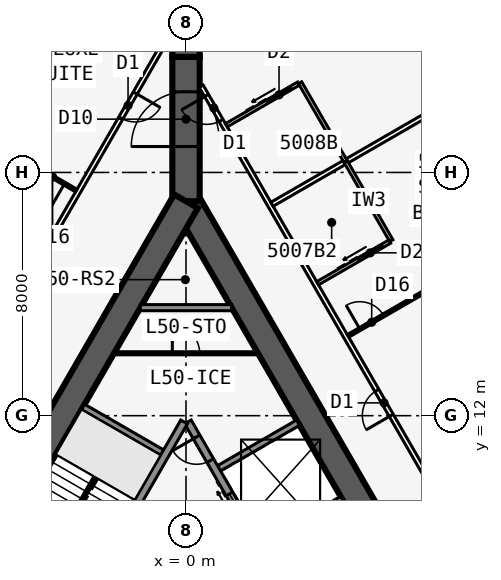
"""IFC4 building model, lengths in metres.
Left out: names, types, materials, properties, quantities, classifications, styles, units other than length and angle.
Written with IfcOpenShell. Run it as: python <this file> out.ifc"""

import sys

from ifc_helpers import new_model, si_unit, direction, frame, frame_2d, origin, place, context, subcontext, project, spatial, rectangle, extrude, element, fill, save


model = new_model("IFC4")
c1 = context("Model", 3, precision=1e-05, world=origin(), true_north=direction((0.0, 1.0)))
c2 = subcontext(c1, "Body", "Model", "MODEL_VIEW")
j1 = project(units=[si_unit("LENGTHUNIT", "METRE"), si_unit("PLANEANGLEUNIT", "RADIAN")], contexts=[c1])
p1 = place(None, origin())
s1 = spatial("IfcSite", under=j1, at=p1, CompositionType="ELEMENT")
p2 = place(p1, origin())
s2 = spatial("IfcBuilding", under=s1, at=p2, CompositionType="ELEMENT")
p3 = place(p2, frame((0.0, 0.0, 186.1)))
s3 = spatial("IfcBuildingStorey", under=s2, at=p3, CompositionType="ELEMENT", Elevation=186.1)
p4 = place(p3, frame((16.5, -9.526, 0.0), z_axis=(0.0, 0.0, 1.0), x_axis=(-0.499999749417, 0.866025548458, 0.0)))
e1 = element("IfcWall", 1, at=p4, inside=s3, PredefinedType="SHEAR", context=c2, shape_type="SweptSolid", body=[
    extrude(rectangle(XDim=33.0, YDim=0.9, at=frame_2d((16.5, 0.0))), origin(), (0.0, 0.0, 1.0), 3.4),
])
p5 = place(p4, frame((14.15, 0.0, 0.0)))
e2 = element("IfcOpeningElement", 2, at=p5, cuts=e1, PredefinedType="OPENING", context=c2, shape_type="SweptSolid", body=[
    extrude(rectangle(XDim=1.8, YDim=2.13, at=frame_2d((0.9, 1.065))), frame((0.0, 0.46, 0.0), z_axis=(0.0, -1.0, 0.0), x_axis=(1.0, 0.0, 0.0)), (0.0, 0.0, 1.0), 0.92),
])
p6 = place(p4, frame((12.6, 0.0, 0.0)))
e3 = element("IfcOpeningElement", 3, at=p6, cuts=e1, PredefinedType="OPENING", context=c2, shape_type="SweptSolid", body=[
    extrude(rectangle(XDim=1.0, YDim=2.13, at=frame_2d((0.5, 1.065))), frame((0.0, 0.46, 0.0), z_axis=(0.0, -1.0, 0.0), x_axis=(1.0, 0.0, 0.0)), (0.0, 0.0, 1.0), 0.92),
])
p7 = place(p3, frame((5.379, 2.586, 0.0), z_axis=(0.0, 0.0, 1.0), x_axis=(-0.500001375892, 0.866024609411, 0.0)))
e4 = element("IfcWall", 4, at=p7, inside=s3, PredefinedType="SOLIDWALL", context=c2, shape_type="SweptSolid", body=[
    extrude(rectangle(XDim=10.633, YDim=0.25, at=frame_2d((5.316, 0.0))), origin(), (0.0, 0.0, 1.0), 3.15),
])
p8 = place(p7, frame((9.164, 0.0, 0.0)))
e5 = element("IfcOpeningElement", 5, at=p8, cuts=e4, PredefinedType="OPENING", context=c2, shape_type="SweptSolid", body=[
    extrude(rectangle(XDim=0.9, YDim=2.13, at=frame_2d((0.45, 1.065))), frame((0.0, 0.135, 0.0), z_axis=(0.0, -1.0, 0.0), x_axis=(1.0, 0.0, 0.0)), (0.0, 0.0, 1.0), 0.27),
])
p9 = place(p7, frame((1.0, 0.0, 0.0)))
e6 = element("IfcOpeningElement", 6, at=p9, cuts=e4, PredefinedType="OPENING", context=c2, shape_type="SweptSolid", body=[
    extrude(rectangle(XDim=1.1, YDim=2.13, at=frame_2d((0.55, 1.065))), frame((0.0, 0.135, 0.0), z_axis=(0.0, -1.0, 0.0), x_axis=(1.0, 0.0, 0.0)), (0.0, 0.0, 1.0), 0.27),
])
p10 = place(p7, frame((3.9, 0.0, 0.0)))
e7 = element("IfcOpeningElement", 7, at=p10, cuts=e4, PredefinedType="OPENING", context=c2, shape_type="SweptSolid", body=[
    extrude(rectangle(XDim=1.1, YDim=2.13, at=frame_2d((0.55, 1.065))), frame((0.0, 0.135, 0.0), z_axis=(0.0, -1.0, 0.0), x_axis=(1.0, 0.0, 0.0)), (0.0, 0.0, 1.0), 0.27),
])
p11 = place(p7, frame((6.8, 0.0, 0.0)))
e8 = element("IfcOpeningElement", 8, at=p11, cuts=e4, PredefinedType="OPENING", context=c2, shape_type="SweptSolid", body=[
    extrude(rectangle(XDim=1.1, YDim=2.13, at=frame_2d((0.55, 1.065))), frame((0.0, 0.135, 0.0), z_axis=(0.0, -1.0, 0.0), x_axis=(1.0, 0.0, 0.0)), (0.0, 0.0, 1.0), 0.27),
])
for number, where, z_axis, x_axis in (
    (9, (2.429, 7.696, 0.0), (0.0, 0.0, 1.0), (0.866, 0.5, 0.0)),
    (10, (0.979, 10.207, 0.0), (0.0, 0.0, 1.0), (0.866, 0.5, 0.0)),
):
    element("IfcWall", number, at=place(p3, frame(where, z_axis=z_axis, x_axis=x_axis)), inside=s3, PredefinedType="SOLIDWALL", context=c2, shape_type="SweptSolid", body=[
        extrude(rectangle(XDim=3.125, YDim=0.2, at=frame_2d((1.562, 0.0))), origin(), (0.0, 0.0, 1.0), 3.15),
    ])
p12 = place(p3, frame((0.0, 19.052, 0.0), z_axis=(0.0, 0.0, 1.0), x_axis=(-0.499999749417, -0.866025548458, 0.0)))
e11 = element("IfcWall", 11, at=p12, inside=s3, PredefinedType="SHEAR", context=c2, shape_type="SweptSolid", body=[
    extrude(rectangle(XDim=33.0, YDim=0.9, at=frame_2d((16.5, 0.0))), origin(), (0.0, 0.0, 1.0), 3.4),
])
p13 = place(p12, frame((14.15, 0.0, 0.0)))
e12 = element("IfcOpeningElement", 12, at=p13, cuts=e11, PredefinedType="OPENING", context=c2, shape_type="SweptSolid", body=[
    extrude(rectangle(XDim=1.8, YDim=2.13, at=frame_2d((0.9, 1.065))), frame((0.0, 0.46, 0.0), z_axis=(0.0, -1.0, 0.0), x_axis=(1.0, 0.0, 0.0)), (0.0, 0.0, 1.0), 0.92),
])
p14 = place(p12, frame((12.6, 0.0, 0.0)))
e13 = element("IfcOpeningElement", 13, at=p14, cuts=e11, PredefinedType="OPENING", context=c2, shape_type="SweptSolid", body=[
    extrude(rectangle(XDim=1.0, YDim=2.13, at=frame_2d((0.5, 1.065))), frame((0.0, 0.46, 0.0), z_axis=(0.0, -1.0, 0.0), x_axis=(1.0, 0.0, 0.0)), (0.0, 0.0, 1.0), 0.92),
])
p15 = place(p3, frame((-0.062, 11.794, 0.0), z_axis=(0.0, 0.0, 1.0), x_axis=(-0.500006680225, -0.86602154692, 0.0)))
e14 = element("IfcWall", 14, at=p15, inside=s3, PredefinedType="SOLIDWALL", context=c2, shape_type="SweptSolid", body=[
    extrude(rectangle(XDim=7.733, YDim=0.25, at=frame_2d((3.866, 0.0))), origin(), (0.0, 0.0, 1.0), 3.15),
])
p16 = place(p3, frame((-0.679, 10.727, 0.0), z_axis=(0.0, 0.0, 1.0), x_axis=(-0.866022959057, 0.500004234368, 0.0)))
e15 = element("IfcWall", 15, at=p16, inside=s3, PredefinedType="SOLIDWALL", context=c2, shape_type="SweptSolid", body=[
    extrude(rectangle(XDim=3.125, YDim=0.2, at=frame_2d((1.562, 0.0))), origin(), (0.0, 0.0, 1.0), 3.15),
])
p17 = place(p3, frame((0.0, 19.052, 0.0), z_axis=(0.0, 0.0, 1.0), x_axis=(0.0, 1.0, 0.0)))
e16 = element("IfcWall", 16, at=p17, inside=s3, PredefinedType="SHEAR", context=c2, shape_type="SweptSolid", body=[
    extrude(rectangle(XDim=4.746, YDim=0.9, at=frame_2d((2.373, 0.0))), origin(), (0.0, 0.0, 1.0), 3.4),
])
p18 = place(p17, frame((1.8, 0.0, 0.0)))
e17 = element("IfcOpeningElement", 17, at=p18, cuts=e16, PredefinedType="OPENING", context=c2, shape_type="SweptSolid", body=[
    extrude(rectangle(XDim=1.8, YDim=2.13, at=frame_2d((0.9, 1.065))), frame((0.0, 0.46, 0.0), z_axis=(0.0, -1.0, 0.0), x_axis=(1.0, 0.0, 0.0)), (0.0, 0.0, 1.0), 0.92),
])
p19 = place(p3, frame((0.0, 23.799, 0.0), z_axis=(0.0, 0.0, 1.0), x_axis=(0.0, 1.0, 0.0)))
e18 = element("IfcWall", 18, at=p19, inside=s3, PredefinedType="SHEAR", context=c2, shape_type="SweptSolid", body=[
    extrude(rectangle(XDim=1.155, YDim=0.9, at=frame_2d((0.577, 0.0))), origin(), (0.0, 0.0, 1.0), 3.4),
])
p20 = place(p3, frame((9.471, 22.754, 0.0), z_axis=(0.0, 0.0, 1.0), x_axis=(-0.691719937936, 0.722165858693, 0.0)))
e19 = element("IfcWall", 19, at=p20, inside=s3, PredefinedType="STANDARD", context=c2, shape_type="SweptSolid", body=[
    extrude(rectangle(XDim=5.148, YDim=0.25, at=frame_2d((2.574, 0.0))), origin(), (0.0, 0.0, 1.0), 3.15),
])
p21 = place(p20, frame((0.774, 0.0, 0.45)))
e20 = element("IfcOpeningElement", 20, at=p21, cuts=e19, PredefinedType="OPENING", context=c2, shape_type="SweptSolid", body=[
    extrude(rectangle(XDim=3.6, YDim=2.4, at=frame_2d((1.8, 1.2))), frame((0.0, 0.135, 0.0), z_axis=(0.0, -1.0, 0.0), x_axis=(1.0, 0.0, 0.0)), (0.0, 0.0, 1.0), 0.27),
])
p22 = place(p3, frame((20.027, -10.985, 0.0), z_axis=(0.0, 0.0, 1.0), x_axis=(-0.500001677587, 0.866024435227, 0.0)))
e21 = element("IfcWall", 21, at=p22, inside=s3, PredefinedType="PARTITIONING", context=c2, shape_type="SweptSolid", body=[
    extrude(rectangle(XDim=39.054, YDim=0.15, at=frame_2d((19.527, 0.0))), origin(), (0.0, 0.0, 1.0), 3.15),
])
p23 = place(p22, frame((1.558, 0.0, 0.0)))
e22 = element("IfcOpeningElement", 22, at=p23, cuts=e21, PredefinedType="OPENING", context=c2, shape_type="SweptSolid", body=[
    extrude(rectangle(XDim=0.95, YDim=2.13, at=frame_2d((0.475, 1.065))), frame((0.0, 0.085, 0.0), z_axis=(0.0, -1.0, 0.0), x_axis=(1.0, 0.0, 0.0)), (0.0, 0.0, 1.0), 0.17),
])
p24 = place(p22, frame((12.752, 0.0, 0.0)))
e23 = element("IfcOpeningElement", 23, at=p24, cuts=e21, PredefinedType="OPENING", context=c2, shape_type="SweptSolid", body=[
    extrude(rectangle(XDim=0.95, YDim=2.13, at=frame_2d((0.475, 1.065))), frame((0.0, 0.085, 0.0), z_axis=(0.0, -1.0, 0.0), x_axis=(1.0, 0.0, 0.0)), (0.0, 0.0, 1.0), 0.17),
])
p25 = place(p22, frame((26.552, 0.0, 0.0)))
e24 = element("IfcOpeningElement", 24, at=p25, cuts=e21, PredefinedType="OPENING", context=c2, shape_type="SweptSolid", body=[
    extrude(rectangle(XDim=0.95, YDim=2.13, at=frame_2d((0.475, 1.065))), frame((0.0, 0.085, 0.0), z_axis=(0.0, -1.0, 0.0), x_axis=(1.0, 0.0, 0.0)), (0.0, 0.0, 1.0), 0.17),
])
p26 = place(p22, frame((37.752, 0.0, 0.0)))
e25 = element("IfcOpeningElement", 25, at=p26, cuts=e21, PredefinedType="OPENING", context=c2, shape_type="SweptSolid", body=[
    extrude(rectangle(XDim=0.95, YDim=2.13, at=frame_2d((0.475, 1.065))), frame((0.0, 0.085, 0.0), z_axis=(0.0, -1.0, 0.0), x_axis=(1.0, 0.0, 0.0)), (0.0, 0.0, 1.0), 0.17),
])
p27 = place(p3, frame((5.329, 14.623, 0.0), z_axis=(0.0, 0.0, 1.0), x_axis=(0.866011723728, 0.500023693804, 0.0)))
e26 = element("IfcWall", 26, at=p27, inside=s3, PredefinedType="PARTITIONING", context=c2, shape_type="SweptSolid", body=[
    extrude(rectangle(XDim=8.395, YDim=0.1, at=frame_2d((4.198, 0.0))), origin(), (0.0, 0.0, 1.0), 2.108),
])
p28 = place(p27, frame((0.45, 0.0, 0.0)))
e27 = element("IfcOpeningElement", 27, at=p28, cuts=e26, PredefinedType="OPENING", context=c2, shape_type="SweptSolid", body=[
    extrude(rectangle(XDim=0.9, YDim=2.032, at=frame_2d((0.45, 1.016))), frame((0.0, 0.06, 0.0), z_axis=(0.0, -1.0, 0.0), x_axis=(1.0, 0.0, 0.0)), (0.0, 0.0, 1.0), 0.12),
])
p29 = place(p3, frame((2.829, 18.954, 0.0), z_axis=(0.0, 0.0, 1.0), x_axis=(0.866015739374, 0.500016738876, 0.0)))
e28 = element("IfcWall", 28, at=p29, inside=s3, PredefinedType="PARTITIONING", context=c2, shape_type="SweptSolid", body=[
    extrude(rectangle(XDim=7.516, YDim=0.15, at=frame_2d((3.758, 0.0))), origin(), (0.0, 0.0, 1.0), 2.05),
])
p30 = place(p3, frame((6.753, 17.755, 0.0), z_axis=(0.0, 0.0, 1.0), x_axis=(-0.499990139034, 0.866031096941, 0.0)))
e29 = element("IfcWall", 29, at=p30, inside=s3, PredefinedType="PLUMBINGWALL", context=c2, shape_type="SweptSolid", body=[
    extrude(rectangle(XDim=3.0, YDim=0.12, at=frame_2d((1.5, 0.0))), origin(), (0.0, 0.0, 1.0), 3.15),
])
p31 = place(p3, frame((4.329, 16.355, 0.0), z_axis=(0.0, 0.0, 1.0), x_axis=(0.866035715982, 0.499982138324, 0.0)))
e30 = element("IfcWall", 30, at=p31, inside=s3, PredefinedType="PLUMBINGWALL", context=c2, shape_type="SweptSolid", body=[
    extrude(rectangle(XDim=2.74, YDim=0.12, at=frame_2d((1.37, 0.0))), origin(), (0.0, 0.0, 1.0), 3.15),
])
p32 = place(p31, frame((1.55, 0.0, 0.0)))
e31 = element("IfcOpeningElement", 31, at=p32, cuts=e30, PredefinedType="OPENING", context=c2, shape_type="SweptSolid", body=[
    extrude(rectangle(XDim=0.9, YDim=2.13, at=frame_2d((0.45, 1.065))), frame((0.0, 0.07, 0.0), z_axis=(0.0, -1.0, 0.0), x_axis=(1.0, 0.0, 0.0)), (0.0, 0.0, 1.0), 0.14),
])
p33 = place(p3, frame((5.253, 20.354, 0.0), z_axis=(0.0, 0.0, 1.0), x_axis=(-0.499990139034, 0.866031096941, 0.0)))
e32 = element("IfcWall", 32, at=p33, inside=s3, PredefinedType="PLUMBINGWALL", context=c2, shape_type="SweptSolid", body=[
    extrude(rectangle(XDim=3.0, YDim=0.12, at=frame_2d((1.5, 0.0))), origin(), (0.0, 0.0, 1.0), 3.15),
])
p34 = place(p3, frame((1.329, 21.552, 0.0), z_axis=(0.0, 0.0, 1.0), x_axis=(0.865997131366, 0.500048966069, 0.0)))
e33 = element("IfcWall", 33, at=p34, inside=s3, PredefinedType="PLUMBINGWALL", context=c2, shape_type="SweptSolid", body=[
    extrude(rectangle(XDim=2.74, YDim=0.12, at=frame_2d((1.37, 0.0))), origin(), (0.0, 0.0, 1.0), 3.15),
])
p35 = place(p34, frame((1.55, 0.0, 0.0)))
e34 = element("IfcOpeningElement", 34, at=p35, cuts=e33, PredefinedType="OPENING", context=c2, shape_type="SweptSolid", body=[
    extrude(rectangle(XDim=0.9, YDim=2.13, at=frame_2d((0.45, 1.065))), frame((0.0, 0.07, 0.0), z_axis=(0.0, -1.0, 0.0), x_axis=(1.0, 0.0, 0.0)), (0.0, 0.0, 1.0), 0.14),
])
p36 = place(p3, frame((-0.5, 24.636, 0.0), z_axis=(0.0, 0.0, 1.0), x_axis=(-0.500001915564, -0.86602429783, 0.0)))
e35 = element("IfcWall", 35, at=p36, inside=s3, PredefinedType="PARTITIONING", context=c2, shape_type="SweptSolid", body=[
    extrude(rectangle(XDim=42.172, YDim=0.15, at=frame_2d((21.086, 0.0))), origin(), (0.0, 0.0, 1.0), 3.15),
])
p37 = place(p36, frame((2.338, 0.0, 0.0)))
e36 = element("IfcOpeningElement", 36, at=p37, cuts=e35, PredefinedType="OPENING", context=c2, shape_type="SweptSolid", body=[
    extrude(rectangle(XDim=0.95, YDim=2.13, at=frame_2d((0.475, 1.065))), frame((0.0, 0.085, 0.0), z_axis=(0.0, -1.0, 0.0), x_axis=(1.0, 0.0, 0.0)), (0.0, 0.0, 1.0), 0.17),
])
p38 = place(p36, frame((18.111, 0.0, 0.0)))
e37 = element("IfcOpeningElement", 37, at=p38, cuts=e35, PredefinedType="OPENING", context=c2, shape_type="SweptSolid", body=[
    extrude(rectangle(XDim=0.95, YDim=2.13, at=frame_2d((0.475, 1.065))), frame((0.0, 0.085, 0.0), z_axis=(0.0, -1.0, 0.0), x_axis=(1.0, 0.0, 0.0)), (0.0, 0.0, 1.0), 0.17),
])
p39 = place(p36, frame((28.111, 0.0, 0.0)))
e38 = element("IfcOpeningElement", 38, at=p39, cuts=e35, PredefinedType="OPENING", context=c2, shape_type="SweptSolid", body=[
    extrude(rectangle(XDim=0.95, YDim=2.13, at=frame_2d((0.475, 1.065))), frame((0.0, 0.085, 0.0), z_axis=(0.0, -1.0, 0.0), x_axis=(1.0, 0.0, 0.0)), (0.0, 0.0, 1.0), 0.17),
])
p40 = place(p36, frame((39.311, 0.0, 0.0)))
e39 = element("IfcOpeningElement", 39, at=p40, cuts=e35, PredefinedType="OPENING", context=c2, shape_type="SweptSolid", body=[
    extrude(rectangle(XDim=0.95, YDim=2.13, at=frame_2d((0.475, 1.065))), frame((0.0, 0.085, 0.0), z_axis=(0.0, -1.0, 0.0), x_axis=(1.0, 0.0, 0.0)), (0.0, 0.0, 1.0), 0.17),
])
p41 = place(p3, frame((-3.608, 19.404, 0.0), z_axis=(0.0, 0.0, 1.0), x_axis=(-0.866015989873, 0.500016305018, 0.0)))
e40 = element("IfcWall", 40, at=p41, inside=s3, PredefinedType="PARTITIONING", context=c2, shape_type="SweptSolid", body=[
    extrude(rectangle(XDim=6.616, YDim=0.1, at=frame_2d((3.308, 0.0))), origin(), (0.0, 0.0, 1.0), 2.05),
])
p42 = place(p41, frame((0.45, 0.0, 0.0)))
e41 = element("IfcOpeningElement", 41, at=p42, cuts=e40, PredefinedType="OPENING", context=c2, shape_type="SweptSolid", body=[
    extrude(rectangle(XDim=0.9, YDim=2.032, at=frame_2d((0.45, 1.016))), frame((0.0, 0.06, 0.0), z_axis=(0.0, -1.0, 0.0), x_axis=(1.0, 0.0, 0.0)), (0.0, 0.0, 1.0), 0.12),
])
p43 = place(p3, frame((-1.501, 15.552, 0.0), z_axis=(0.0, 0.0, 1.0), x_axis=(1.0, 0.0, 0.0)))
e42 = element("IfcWall", 42, at=p43, inside=s3, PredefinedType="SOLIDWALL", context=c2, shape_type="SweptSolid", body=[
    extrude(rectangle(XDim=3.002, YDim=0.2, at=frame_2d((1.501, 0.0))), origin(), (0.0, 0.0, 1.0), 3.15),
])
p44 = place(p3, frame((-2.367, 14.052, 0.0), z_axis=(0.0, 0.0, 1.0), x_axis=(1.0, 0.0, 0.0)))
e43 = element("IfcWall", 43, at=p44, inside=s3, PredefinedType="PARTITIONING", context=c2, shape_type="SweptSolid", body=[
    extrude(rectangle(XDim=4.734, YDim=0.1, at=frame_2d((2.367, 0.0))), origin(), (0.0, 0.0, 1.0), 3.15),
])
p45 = place(p44, frame((1.917, 0.0, 0.0)))
e44 = element("IfcOpeningElement", 44, at=p45, cuts=e43, PredefinedType="OPENING", context=c2, shape_type="SweptSolid", body=[
    extrude(rectangle(XDim=0.9, YDim=2.13, at=frame_2d((0.45, 1.065))), frame((0.0, 0.06, 0.0), z_axis=(0.0, -1.0, 0.0), x_axis=(1.0, 0.0, 0.0)), (0.0, 0.0, 1.0), 0.12),
])
p46 = place(p3, frame((-2.988, 9.978, 0.0), z_axis=(0.0, 0.0, 1.0), x_axis=(-0.499992232847, -0.866029888106, 0.0)))
e45 = element("IfcWall", 45, at=p46, inside=s3, PredefinedType="SOLIDWALL", context=c2, shape_type="SweptSolid", body=[
    extrude(rectangle(XDim=2.794, YDim=0.1, at=frame_2d((1.397, 0.0))), origin(), (0.0, 0.0, 1.0), 3.4),
])
p47 = place(p21, origin())
e46 = element("IfcWindow", 46, at=p47, inside=s3, PartitioningType="SINGLE_PANEL", PredefinedType="WINDOW", context=c2, shape_type="SweptSolid", body=[
    extrude(rectangle(XDim=3.6, YDim=2.4, at=frame_2d((1.8, 1.2))), frame((0.0, 0.03, 0.0), z_axis=(0.0, -1.0, 0.0), x_axis=(1.0, 0.0, 0.0)), (0.0, 0.0, 1.0), 0.06),
])
fill(e20, e46)
p48 = place(p28, origin())
e47 = element("IfcDoor", 47, at=p48, inside=s3, OperationType="SINGLE_SWING_LEFT", PredefinedType="DOOR", context=c2, shape_type="SweptSolid", body=[
    extrude(rectangle(XDim=0.9, YDim=2.032, at=frame_2d((0.45, 1.016))), frame((0.0, 0.025, 0.0), z_axis=(0.0, -1.0, 0.0), x_axis=(1.0, 0.0, 0.0)), (0.0, 0.0, 1.0), 0.05),
])
fill(e27, e47)
p49 = place(p25, origin())
e48 = element("IfcDoor", 48, at=p49, inside=s3, OperationType="SINGLE_SWING_LEFT", PredefinedType="DOOR", context=c2, shape_type="SweptSolid", body=[
    extrude(rectangle(XDim=0.95, YDim=2.13, at=frame_2d((0.475, 1.065))), frame((0.0, 0.025, 0.0), z_axis=(0.0, -1.0, 0.0), x_axis=(1.0, 0.0, 0.0)), (0.0, 0.0, 1.0), 0.05),
])
fill(e24, e48)
p50 = place(p32, origin())
e49 = element("IfcDoor", 49, at=p50, inside=s3, OperationType="SLIDING_TO_LEFT", PredefinedType="DOOR", context=c2, shape_type="SweptSolid", body=[
    extrude(rectangle(XDim=0.9, YDim=2.13, at=frame_2d((0.45, 1.065))), frame((0.0, 0.025, 0.0), z_axis=(0.0, -1.0, 0.0), x_axis=(1.0, 0.0, 0.0)), (0.0, 0.0, 1.0), 0.05),
])
fill(e31, e49)
p51 = place(p35, origin())
e50 = element("IfcDoor", 50, at=p51, inside=s3, OperationType="SLIDING_TO_LEFT", PredefinedType="DOOR", context=c2, shape_type="SweptSolid", body=[
    extrude(rectangle(XDim=0.9, YDim=2.13, at=frame_2d((0.45, 1.065))), frame((0.0, 0.025, 0.0), z_axis=(0.0, -1.0, 0.0), x_axis=(1.0, 0.0, 0.0)), (0.0, 0.0, 1.0), 0.05),
])
fill(e34, e50)
p52 = place(p26, origin())
e51 = element("IfcDoor", 51, at=p52, inside=s3, OperationType="SINGLE_SWING_RIGHT", PredefinedType="DOOR", context=c2, shape_type="SweptSolid", body=[
    extrude(rectangle(XDim=0.95, YDim=2.13, at=frame_2d((0.475, 1.065))), frame((0.0, 0.025, 0.0), z_axis=(0.0, -1.0, 0.0), x_axis=(1.0, 0.0, 0.0)), (0.0, 0.0, 1.0), 0.05),
])
fill(e25, e51)
p53 = place(p42, origin())
e52 = element("IfcDoor", 52, at=p53, inside=s3, OperationType="SINGLE_SWING_LEFT", PredefinedType="DOOR", context=c2, shape_type="SweptSolid", body=[
    extrude(rectangle(XDim=0.9, YDim=2.032, at=frame_2d((0.45, 1.016))), frame((0.0, 0.025, 0.0), z_axis=(0.0, -1.0, 0.0), x_axis=(1.0, 0.0, 0.0)), (0.0, 0.0, 1.0), 0.05),
])
fill(e41, e52)
p54 = place(p37, origin())
e53 = element("IfcDoor", 53, at=p54, inside=s3, OperationType="SINGLE_SWING_LEFT", PredefinedType="DOOR", context=c2, shape_type="SweptSolid", body=[
    extrude(rectangle(XDim=0.95, YDim=2.13, at=frame_2d((0.475, 1.065))), frame((0.0, 0.025, 0.0), z_axis=(0.0, -1.0, 0.0), x_axis=(1.0, 0.0, 0.0)), (0.0, 0.0, 1.0), 0.05),
])
fill(e36, e53)
p55 = place(p18, origin())
e54 = element("IfcDoor", 54, at=p55, inside=s3, OperationType="DOUBLE_DOOR_DOUBLE_SWING", PredefinedType="DOOR", context=c2, shape_type="SweptSolid", body=[
    extrude(rectangle(XDim=1.8, YDim=2.13, at=frame_2d((0.9, 1.065))), frame((0.0, 0.025, 0.0), z_axis=(0.0, -1.0, 0.0), x_axis=(1.0, 0.0, 0.0)), (0.0, 0.0, 1.0), 0.05),
])
fill(e17, e54)
p56 = place(p45, origin())
e55 = element("IfcDoor", 55, at=p56, inside=s3, OperationType="SINGLE_SWING_LEFT", PredefinedType="DOOR", context=c2, shape_type="SweptSolid", body=[
    extrude(rectangle(XDim=0.9, YDim=2.13, at=frame_2d((0.45, 1.065))), frame((0.0, 0.025, 0.0), z_axis=(0.0, -1.0, 0.0), x_axis=(1.0, 0.0, 0.0)), (0.0, 0.0, 1.0), 0.05),
])
fill(e44, e55)
p57 = place(p8, origin())
e56 = element("IfcDoor", 56, at=p57, inside=s3, OperationType="SINGLE_SWING_RIGHT", PredefinedType="DOOR", context=c2, shape_type="SweptSolid", body=[
    extrude(rectangle(XDim=0.9, YDim=2.13, at=frame_2d((0.45, 1.065))), frame((0.0, 0.025, 0.0), z_axis=(0.0, -1.0, 0.0), x_axis=(1.0, 0.0, 0.0)), (0.0, 0.0, 1.0), 0.05),
])
fill(e5, e56)
p58 = place(p11, origin())
e57 = element("IfcDoor", 57, at=p58, inside=s3, OperationType="DOUBLE_DOOR_SLIDING", PredefinedType="USERDEFINED", context=c2, shape_type="SweptSolid", body=[
    extrude(rectangle(XDim=1.1, YDim=2.13, at=frame_2d((0.55, 1.065))), frame((0.0, 0.025, 0.0), z_axis=(0.0, -1.0, 0.0), x_axis=(1.0, 0.0, 0.0)), (0.0, 0.0, 1.0), 0.05),
])
fill(e8, e57)
save(model, sys.argv[1])
